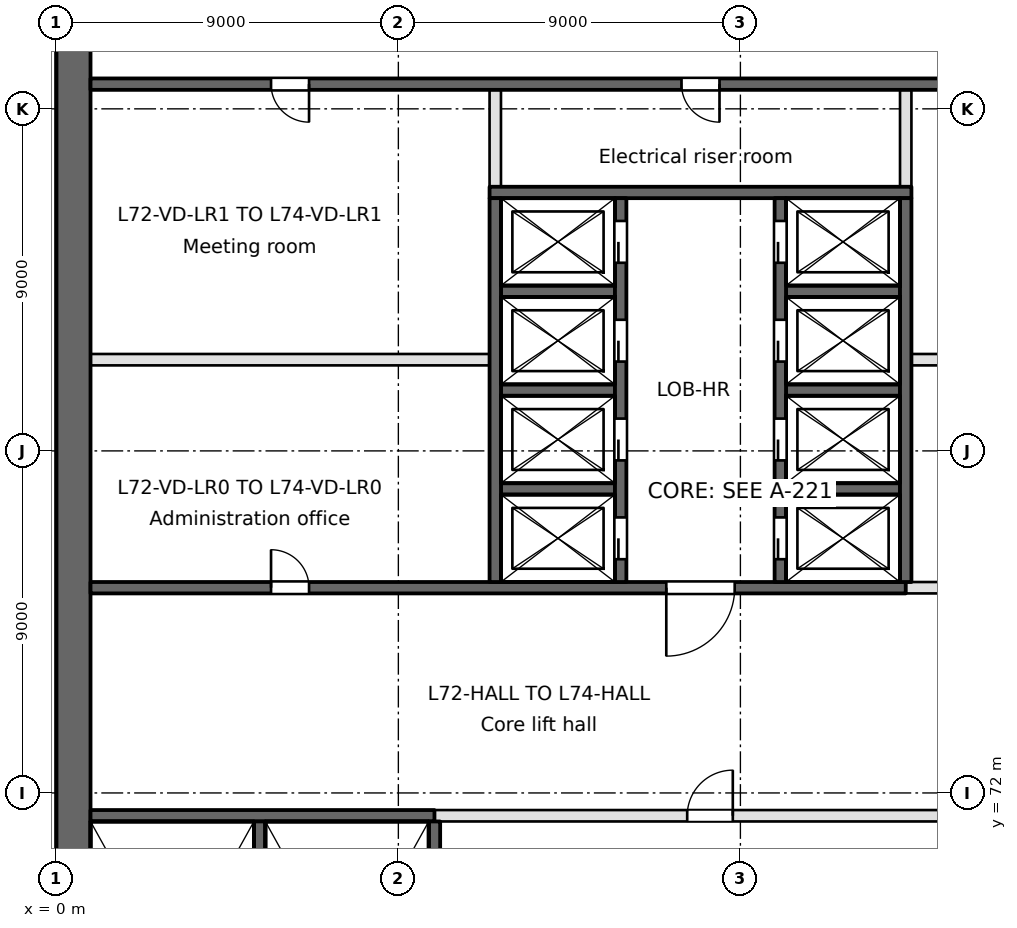
"""IFC4 building model, lengths in metres.
Left out: names, types, materials, properties, quantities, classifications, styles, units other than length and angle.
Written with IfcOpenShell. Run it as: python <this file> out.ifc"""

import sys

from ifc_helpers import new_model, si_unit, direction, frame, frame_2d, origin, place, context, subcontext, project, spatial, rectangle, extrude, element, fill, save


model = new_model("IFC4")
c1 = context("Model", 3, precision=1e-05, world=origin(), true_north=direction((0.0, 1.0)))
c2 = subcontext(c1, "Body", "Model", "MODEL_VIEW")
j1 = project(units=[si_unit("LENGTHUNIT", "METRE"), si_unit("PLANEANGLEUNIT", "RADIAN")], contexts=[c1])
p1 = place(None, origin())
s1 = spatial("IfcSite", under=j1, at=p1, CompositionType="ELEMENT")
p2 = place(p1, origin())
s2 = spatial("IfcBuilding", under=s1, at=p2, CompositionType="ELEMENT")
p3 = place(p2, frame((0.0, 0.0, 280.8)))
s3 = spatial("IfcBuildingStorey", under=s2, at=p3, CompositionType="ELEMENT", Elevation=280.8)
p4 = place(p3, frame((0.45, 94.5, 0.0), z_axis=(0.0, 0.0, 1.0), x_axis=(0.0, -1.0, 0.0)))
e1 = element("IfcWall", 1, at=p4, inside=s3, PredefinedType="SHEAR", context=c2, shape_type="SweptSolid", body=[
    extrude(rectangle(XDim=40.456, YDim=0.9, at=frame_2d((20.228, 0.0))), origin(), (0.0, 0.0, 1.0), 3.7),
])
p5 = place(p3, frame((0.9, 71.4, -0.4), z_axis=(0.0, 0.0, 1.0), x_axis=(1.0, 0.0, 0.0)))
e2 = element("IfcWall", 2, at=p5, inside=s3, PredefinedType="SOLIDWALL", context=c2, shape_type="SweptSolid", body=[
    extrude(rectangle(XDim=9.05, YDim=0.3, at=frame_2d((4.525, 0.0))), origin(), (0.0, 0.0, 1.0), 3.7),
])
p6 = place(p3, frame((9.95, 71.4, 0.0), z_axis=(0.0, 0.0, 1.0), x_axis=(1.0, 0.0, 0.0)))
e3 = element("IfcWall", 3, at=p6, inside=s3, PredefinedType="PARTITIONING", context=c2, shape_type="SweptSolid", body=[
    extrude(rectangle(XDim=17.65, YDim=0.3, at=frame_2d((8.825, 0.0))), origin(), (0.0, 0.0, 1.0), 3.3),
])
p7 = place(p6, frame((15.1, 0.0, 0.0)))
e4 = element("IfcOpeningElement", 4, at=p7, cuts=e3, PredefinedType="OPENING", context=c2, shape_type="SweptSolid", body=[
    extrude(rectangle(XDim=1.8, YDim=2.1, at=frame_2d((0.9, 1.05))), frame((0.0, 0.15, 0.0), z_axis=(0.0, -1.0, 0.0), x_axis=(1.0, 0.0, 0.0)), (0.0, 0.0, 1.0), 0.3),
])
p8 = place(p6, frame((6.65, 0.0, 0.0)))
e5 = element("IfcOpeningElement", 5, at=p8, cuts=e3, PredefinedType="OPENING", context=c2, shape_type="SweptSolid", body=[
    extrude(rectangle(XDim=1.2, YDim=2.1, at=frame_2d((0.6, 1.05))), frame((0.0, 0.15, 0.0), z_axis=(0.0, -1.0, 0.0), x_axis=(1.0, 0.0, 0.0)), (0.0, 0.0, 1.0), 0.3),
])
p9 = place(p3, frame((0.9, 77.4, -0.4), z_axis=(0.0, 0.0, 1.0), x_axis=(1.0, 0.0, 0.0)))
e6 = element("IfcWall", 6, at=p9, inside=s3, PredefinedType="SOLIDWALL", context=c2, shape_type="SweptSolid", body=[
    extrude(rectangle(XDim=21.45, YDim=0.3, at=frame_2d((10.725, 0.0))), origin(), (0.0, 0.0, 1.0), 3.7),
])
p10 = place(p9, frame((15.15, 0.0, 0.4)))
e7 = element("IfcOpeningElement", 7, at=p10, cuts=e6, PredefinedType="OPENING", context=c2, shape_type="SweptSolid", body=[
    extrude(rectangle(XDim=1.8, YDim=2.1, at=frame_2d((0.9, 1.05))), frame((0.0, 0.15, 0.0), z_axis=(0.0, -1.0, 0.0), x_axis=(1.0, 0.0, 0.0)), (0.0, 0.0, 1.0), 0.3),
])
p11 = place(p9, frame((4.75, 0.0, 0.4)))
e8 = element("IfcOpeningElement", 8, at=p11, cuts=e6, PredefinedType="OPENING", context=c2, shape_type="SweptSolid", body=[
    extrude(rectangle(XDim=1.0, YDim=2.1, at=frame_2d((0.5, 1.05))), frame((0.0, 0.15, 0.0), z_axis=(0.0, -1.0, 0.0), x_axis=(1.0, 0.0, 0.0)), (0.0, 0.0, 1.0), 0.3),
])
p12 = place(p3, frame((22.35, 77.4, 0.0), z_axis=(0.0, 0.0, 1.0), x_axis=(1.0, 0.0, 0.0)))
e9 = element("IfcWall", 9, at=p12, inside=s3, PredefinedType="PARTITIONING", context=c2, shape_type="SweptSolid", body=[
    extrude(rectangle(XDim=13.15, YDim=0.3, at=frame_2d((6.575, 0.0))), origin(), (0.0, 0.0, 1.0), 3.3),
])
p13 = place(p12, frame((6.2, 0.0, 0.0)))
e10 = element("IfcOpeningElement", 10, at=p13, cuts=e9, PredefinedType="OPENING", context=c2, shape_type="SweptSolid", body=[
    extrude(rectangle(XDim=1.0, YDim=2.1, at=frame_2d((0.5, 1.05))), frame((0.0, 0.15, 0.0), z_axis=(0.0, -1.0, 0.0), x_axis=(1.0, 0.0, 0.0)), (0.0, 0.0, 1.0), 0.3),
])
for number, where, z_axis, x_axis in (
    (11, (11.7, 80.0, -0.4), (0.0, 0.0, 1.0), (1.0, 0.0, 0.0)),
    (12, (19.2, 80.0, -0.4), (0.0, 0.0, 1.0), (1.0, 0.0, 0.0)),
    (13, (11.7, 82.6, -0.4), (0.0, 0.0, 1.0), (1.0, 0.0, 0.0)),
    (14, (19.2, 82.6, -0.4), (0.0, 0.0, 1.0), (1.0, 0.0, 0.0)),
):
    element("IfcWall", number, at=place(p3, frame(where, z_axis=z_axis, x_axis=x_axis)), inside=s3, PredefinedType="SOLIDWALL", context=c2, shape_type="SweptSolid", body=[
        extrude(rectangle(XDim=3.0, YDim=0.3, at=frame_2d((1.5, 0.0))), origin(), (0.0, 0.0, 1.0), 3.7),
    ])
p14 = place(p3, frame((0.9, 83.4, 0.0), z_axis=(0.0, 0.0, 1.0), x_axis=(1.0, 0.0, 0.0)))
e15 = element("IfcWall", 15, at=p14, inside=s3, PredefinedType="PARTITIONING", context=c2, shape_type="SweptSolid", body=[
    extrude(rectangle(XDim=10.5, YDim=0.3, at=frame_2d((5.25, 0.0))), origin(), (0.0, 0.0, 1.0), 3.3),
])
p15 = place(p3, frame((22.5, 83.4, 0.0), z_axis=(0.0, 0.0, 1.0), x_axis=(1.0, 0.0, 0.0)))
e16 = element("IfcWall", 16, at=p15, inside=s3, PredefinedType="PARTITIONING", context=c2, shape_type="SweptSolid", body=[
    extrude(rectangle(XDim=13.0, YDim=0.3, at=frame_2d((6.5, 0.0))), origin(), (0.0, 0.0, 1.0), 3.3),
])
for number, where, z_axis, x_axis in (
    (17, (11.7, 85.2, -0.4), (0.0, 0.0, 1.0), (1.0, 0.0, 0.0)),
    (18, (19.2, 85.2, -0.4), (0.0, 0.0, 1.0), (1.0, 0.0, 0.0)),
):
    element("IfcWall", number, at=place(p3, frame(where, z_axis=z_axis, x_axis=x_axis)), inside=s3, PredefinedType="SOLIDWALL", context=c2, shape_type="SweptSolid", body=[
        extrude(rectangle(XDim=3.0, YDim=0.3, at=frame_2d((1.5, 0.0))), origin(), (0.0, 0.0, 1.0), 3.7),
    ])
p16 = place(p3, frame((11.4, 87.8, -0.4), z_axis=(0.0, 0.0, 1.0), x_axis=(1.0, 0.0, 0.0)))
e19 = element("IfcWall", 19, at=p16, inside=s3, PredefinedType="SOLIDWALL", context=c2, shape_type="SweptSolid", body=[
    extrude(rectangle(XDim=11.1, YDim=0.3, at=frame_2d((5.55, 0.0))), origin(), (0.0, 0.0, 1.0), 3.7),
])
p17 = place(p3, frame((0.9, 90.65, -0.4), z_axis=(0.0, 0.0, 1.0), x_axis=(1.0, 0.0, 0.0)))
e20 = element("IfcWall", 20, at=p17, inside=s3, PredefinedType="SOLIDWALL", context=c2, shape_type="SweptSolid", body=[
    extrude(rectangle(XDim=34.6, YDim=0.3, at=frame_2d((17.3, 0.0))), origin(), (0.0, 0.0, 1.0), 3.7),
])
p18 = place(p17, frame((15.55, 0.0, 0.4)))
e21 = element("IfcOpeningElement", 21, at=p18, cuts=e20, PredefinedType="OPENING", context=c2, shape_type="SweptSolid", body=[
    extrude(rectangle(XDim=1.0, YDim=2.1, at=frame_2d((0.5, 1.05))), frame((0.0, 0.15, 0.0), z_axis=(0.0, -1.0, 0.0), x_axis=(1.0, 0.0, 0.0)), (0.0, 0.0, 1.0), 0.3),
])
p19 = place(p17, frame((4.75, 0.0, 0.4)))
e22 = element("IfcOpeningElement", 22, at=p19, cuts=e20, PredefinedType="OPENING", context=c2, shape_type="SweptSolid", body=[
    extrude(rectangle(XDim=1.0, YDim=2.1, at=frame_2d((0.5, 1.05))), frame((0.0, 0.15, 0.0), z_axis=(0.0, -1.0, 0.0), x_axis=(1.0, 0.0, 0.0)), (0.0, 0.0, 1.0), 0.3),
])
p20 = place(p17, frame((27.65, 0.0, 0.4)))
e23 = element("IfcOpeningElement", 23, at=p20, cuts=e20, PredefinedType="OPENING", context=c2, shape_type="SweptSolid", body=[
    extrude(rectangle(XDim=1.0, YDim=2.1, at=frame_2d((0.5, 1.05))), frame((0.0, 0.15, 0.0), z_axis=(0.0, -1.0, 0.0), x_axis=(1.0, 0.0, 0.0)), (0.0, 0.0, 1.0), 0.3),
])
for number, where, z_axis, x_axis in (
    (24, (5.35, 63.5, -0.4), (0.0, 0.0, 1.0), (0.0, 1.0, 0.0)),
    (25, (9.95, 63.5, -0.4), (0.0, 0.0, 1.0), (0.0, 1.0, 0.0)),
):
    element("IfcWall", number, at=place(p3, frame(where, z_axis=z_axis, x_axis=x_axis)), inside=s3, PredefinedType="SOLIDWALL", context=c2, shape_type="SweptSolid", body=[
        extrude(rectangle(XDim=7.75, YDim=0.3, at=frame_2d((3.875, 0.0))), origin(), (0.0, 0.0, 1.0), 3.7),
    ])
p21 = place(p3, frame((11.55, 77.55, -0.4), z_axis=(0.0, 0.0, 1.0), x_axis=(0.0, 1.0, 0.0)))
e26 = element("IfcWall", 26, at=p21, inside=s3, PredefinedType="SOLIDWALL", context=c2, shape_type="SweptSolid", body=[
    extrude(rectangle(XDim=10.1, YDim=0.3, at=frame_2d((5.05, 0.0))), origin(), (0.0, 0.0, 1.0), 3.7),
])
p22 = place(p3, frame((11.55, 87.95, 0.0), z_axis=(0.0, 0.0, 1.0), x_axis=(0.0, 1.0, 0.0)))
e27 = element("IfcWall", 27, at=p22, inside=s3, PredefinedType="PARTITIONING", context=c2, shape_type="SweptSolid", body=[
    extrude(rectangle(XDim=2.55, YDim=0.3, at=frame_2d((1.275, 0.0))), origin(), (0.0, 0.0, 1.0), 3.3),
])
p23 = place(p3, frame((14.85, 77.55, -0.4), z_axis=(0.0, 0.0, 1.0), x_axis=(0.0, 1.0, 0.0)))
e28 = element("IfcWall", 28, at=p23, inside=s3, PredefinedType="SOLIDWALL", context=c2, shape_type="SweptSolid", body=[
    extrude(rectangle(XDim=10.1, YDim=0.3, at=frame_2d((5.05, 0.0))), origin(), (0.0, 0.0, 1.0), 3.7),
])
p24 = place(p23, frame((0.6, 0.0, 0.4)))
e29 = element("IfcOpeningElement", 29, at=p24, cuts=e28, PredefinedType="OPENING", context=c2, shape_type="SweptSolid", body=[
    extrude(rectangle(XDim=1.1, YDim=2.1, at=frame_2d((0.55, 1.05))), frame((0.0, 0.15, 0.0), z_axis=(0.0, -1.0, 0.0), x_axis=(1.0, 0.0, 0.0)), (0.0, 0.0, 1.0), 0.3),
])
p25 = place(p23, frame((3.2, 0.0, 0.4)))
e30 = element("IfcOpeningElement", 30, at=p25, cuts=e28, PredefinedType="OPENING", context=c2, shape_type="SweptSolid", body=[
    extrude(rectangle(XDim=1.1, YDim=2.1, at=frame_2d((0.55, 1.05))), frame((0.0, 0.15, 0.0), z_axis=(0.0, -1.0, 0.0), x_axis=(1.0, 0.0, 0.0)), (0.0, 0.0, 1.0), 0.3),
])
p26 = place(p23, frame((5.8, 0.0, 0.4)))
e31 = element("IfcOpeningElement", 31, at=p26, cuts=e28, PredefinedType="OPENING", context=c2, shape_type="SweptSolid", body=[
    extrude(rectangle(XDim=1.1, YDim=2.1, at=frame_2d((0.55, 1.05))), frame((0.0, 0.15, 0.0), z_axis=(0.0, -1.0, 0.0), x_axis=(1.0, 0.0, 0.0)), (0.0, 0.0, 1.0), 0.3),
])
p27 = place(p23, frame((8.4, 0.0, 0.4)))
e32 = element("IfcOpeningElement", 32, at=p27, cuts=e28, PredefinedType="OPENING", context=c2, shape_type="SweptSolid", body=[
    extrude(rectangle(XDim=1.1, YDim=2.1, at=frame_2d((0.55, 1.05))), frame((0.0, 0.15, 0.0), z_axis=(0.0, -1.0, 0.0), x_axis=(1.0, 0.0, 0.0)), (0.0, 0.0, 1.0), 0.3),
])
p28 = place(p3, frame((19.05, 77.55, -0.4), z_axis=(0.0, 0.0, 1.0), x_axis=(0.0, 1.0, 0.0)))
e33 = element("IfcWall", 33, at=p28, inside=s3, PredefinedType="SOLIDWALL", context=c2, shape_type="SweptSolid", body=[
    extrude(rectangle(XDim=10.1, YDim=0.3, at=frame_2d((5.05, 0.0))), origin(), (0.0, 0.0, 1.0), 3.7),
])
p29 = place(p28, frame((0.6, 0.0, 0.4)))
e34 = element("IfcOpeningElement", 34, at=p29, cuts=e33, PredefinedType="OPENING", context=c2, shape_type="SweptSolid", body=[
    extrude(rectangle(XDim=1.1, YDim=2.1, at=frame_2d((0.55, 1.05))), frame((0.0, 0.15, 0.0), z_axis=(0.0, -1.0, 0.0), x_axis=(1.0, 0.0, 0.0)), (0.0, 0.0, 1.0), 0.3),
])
p30 = place(p28, frame((3.2, 0.0, 0.4)))
e35 = element("IfcOpeningElement", 35, at=p30, cuts=e33, PredefinedType="OPENING", context=c2, shape_type="SweptSolid", body=[
    extrude(rectangle(XDim=1.1, YDim=2.1, at=frame_2d((0.55, 1.05))), frame((0.0, 0.15, 0.0), z_axis=(0.0, -1.0, 0.0), x_axis=(1.0, 0.0, 0.0)), (0.0, 0.0, 1.0), 0.3),
])
p31 = place(p28, frame((5.8, 0.0, 0.4)))
e36 = element("IfcOpeningElement", 36, at=p31, cuts=e33, PredefinedType="OPENING", context=c2, shape_type="SweptSolid", body=[
    extrude(rectangle(XDim=1.1, YDim=2.1, at=frame_2d((0.55, 1.05))), frame((0.0, 0.15, 0.0), z_axis=(0.0, -1.0, 0.0), x_axis=(1.0, 0.0, 0.0)), (0.0, 0.0, 1.0), 0.3),
])
p32 = place(p28, frame((8.4, 0.0, 0.4)))
e37 = element("IfcOpeningElement", 37, at=p32, cuts=e33, PredefinedType="OPENING", context=c2, shape_type="SweptSolid", body=[
    extrude(rectangle(XDim=1.1, YDim=2.1, at=frame_2d((0.55, 1.05))), frame((0.0, 0.15, 0.0), z_axis=(0.0, -1.0, 0.0), x_axis=(1.0, 0.0, 0.0)), (0.0, 0.0, 1.0), 0.3),
])
p33 = place(p3, frame((22.35, 77.55, -0.4), z_axis=(0.0, 0.0, 1.0), x_axis=(0.0, 1.0, 0.0)))
e38 = element("IfcWall", 38, at=p33, inside=s3, PredefinedType="SOLIDWALL", context=c2, shape_type="SweptSolid", body=[
    extrude(rectangle(XDim=10.1, YDim=0.3, at=frame_2d((5.05, 0.0))), origin(), (0.0, 0.0, 1.0), 3.7),
])
p34 = place(p3, frame((22.35, 87.95, 0.0), z_axis=(0.0, 0.0, 1.0), x_axis=(0.0, 1.0, 0.0)))
e39 = element("IfcWall", 39, at=p34, inside=s3, PredefinedType="PARTITIONING", context=c2, shape_type="SweptSolid", body=[
    extrude(rectangle(XDim=2.55, YDim=0.3, at=frame_2d((1.275, 0.0))), origin(), (0.0, 0.0, 1.0), 3.3),
])
p35 = place(p24, origin())
e40 = element("IfcDoor", 40, at=p35, inside=s3, OperationType="SLIDING_TO_RIGHT", PredefinedType="DOOR", context=c2, shape_type="SweptSolid", body=[
    extrude(rectangle(XDim=1.1, YDim=2.1, at=frame_2d((0.55, 1.05))), frame((0.0, 0.025, 0.0), z_axis=(0.0, -1.0, 0.0), x_axis=(1.0, 0.0, 0.0)), (0.0, 0.0, 1.0), 0.05),
])
fill(e29, e40)
p36 = place(p25, origin())
e41 = element("IfcDoor", 41, at=p36, inside=s3, OperationType="SLIDING_TO_LEFT", PredefinedType="DOOR", context=c2, shape_type="SweptSolid", body=[
    extrude(rectangle(XDim=1.1, YDim=2.1, at=frame_2d((0.55, 1.05))), frame((0.0, 0.025, 0.0), z_axis=(0.0, -1.0, 0.0), x_axis=(1.0, 0.0, 0.0)), (0.0, 0.0, 1.0), 0.05),
])
fill(e30, e41)
p37 = place(p26, origin())
e42 = element("IfcDoor", 42, at=p37, inside=s3, OperationType="SLIDING_TO_RIGHT", PredefinedType="DOOR", context=c2, shape_type="SweptSolid", body=[
    extrude(rectangle(XDim=1.1, YDim=2.1, at=frame_2d((0.55, 1.05))), frame((0.0, 0.025, 0.0), z_axis=(0.0, -1.0, 0.0), x_axis=(1.0, 0.0, 0.0)), (0.0, 0.0, 1.0), 0.05),
])
fill(e31, e42)
p38 = place(p27, origin())
e43 = element("IfcDoor", 43, at=p38, inside=s3, OperationType="SLIDING_TO_LEFT", PredefinedType="DOOR", context=c2, shape_type="SweptSolid", body=[
    extrude(rectangle(XDim=1.1, YDim=2.1, at=frame_2d((0.55, 1.05))), frame((0.0, 0.025, 0.0), z_axis=(0.0, -1.0, 0.0), x_axis=(1.0, 0.0, 0.0)), (0.0, 0.0, 1.0), 0.05),
])
fill(e32, e43)
p39 = place(p29, origin())
e44 = element("IfcDoor", 44, at=p39, inside=s3, OperationType="SLIDING_TO_RIGHT", PredefinedType="DOOR", context=c2, shape_type="SweptSolid", body=[
    extrude(rectangle(XDim=1.1, YDim=2.1, at=frame_2d((0.55, 1.05))), frame((0.0, 0.025, 0.0), z_axis=(0.0, -1.0, 0.0), x_axis=(1.0, 0.0, 0.0)), (0.0, 0.0, 1.0), 0.05),
])
fill(e34, e44)
p40 = place(p30, origin())
e45 = element("IfcDoor", 45, at=p40, inside=s3, OperationType="SLIDING_TO_LEFT", PredefinedType="DOOR", context=c2, shape_type="SweptSolid", body=[
    extrude(rectangle(XDim=1.1, YDim=2.1, at=frame_2d((0.55, 1.05))), frame((0.0, 0.025, 0.0), z_axis=(0.0, -1.0, 0.0), x_axis=(1.0, 0.0, 0.0)), (0.0, 0.0, 1.0), 0.05),
])
fill(e35, e45)
p41 = place(p31, origin())
e46 = element("IfcDoor", 46, at=p41, inside=s3, OperationType="SLIDING_TO_RIGHT", PredefinedType="DOOR", context=c2, shape_type="SweptSolid", body=[
    extrude(rectangle(XDim=1.1, YDim=2.1, at=frame_2d((0.55, 1.05))), frame((0.0, 0.025, 0.0), z_axis=(0.0, -1.0, 0.0), x_axis=(1.0, 0.0, 0.0)), (0.0, 0.0, 1.0), 0.05),
])
fill(e36, e46)
p42 = place(p32, origin())
e47 = element("IfcDoor", 47, at=p42, inside=s3, OperationType="SLIDING_TO_LEFT", PredefinedType="DOOR", context=c2, shape_type="SweptSolid", body=[
    extrude(rectangle(XDim=1.1, YDim=2.1, at=frame_2d((0.55, 1.05))), frame((0.0, 0.025, 0.0), z_axis=(0.0, -1.0, 0.0), x_axis=(1.0, 0.0, 0.0)), (0.0, 0.0, 1.0), 0.05),
])
fill(e37, e47)
p43 = place(p10, frame((1.8, 0.0, 0.0), z_axis=(0.0, 0.0, 1.0), x_axis=(-1.0, 0.0, 0.0)))
e48 = element("IfcDoor", 48, at=p43, inside=s3, OperationType="SINGLE_SWING_RIGHT", PredefinedType="DOOR", context=c2, shape_type="SweptSolid", body=[
    extrude(rectangle(XDim=1.8, YDim=2.1, at=frame_2d((0.9, 1.05))), frame((0.0, 0.025, 0.0), z_axis=(0.0, -1.0, 0.0), x_axis=(1.0, 0.0, 0.0)), (0.0, 0.0, 1.0), 0.05),
])
fill(e7, e48)
p44 = place(p8, origin())
e49 = element("IfcDoor", 49, at=p44, inside=s3, OperationType="SINGLE_SWING_RIGHT", PredefinedType="DOOR", context=c2, shape_type="SweptSolid", body=[
    extrude(rectangle(XDim=1.2, YDim=2.1, at=frame_2d((0.6, 1.05))), frame((0.0, 0.025, 0.0), z_axis=(0.0, -1.0, 0.0), x_axis=(1.0, 0.0, 0.0)), (0.0, 0.0, 1.0), 0.05),
])
fill(e5, e49)
p45 = place(p18, frame((1.0, 0.0, 0.0), z_axis=(0.0, 0.0, 1.0), x_axis=(-1.0, 0.0, 0.0)))
e50 = element("IfcDoor", 50, at=p45, inside=s3, OperationType="SINGLE_SWING_LEFT", PredefinedType="DOOR", context=c2, shape_type="SweptSolid", body=[
    extrude(rectangle(XDim=1.0, YDim=2.1, at=frame_2d((0.5, 1.05))), frame((0.0, 0.025, 0.0), z_axis=(0.0, -1.0, 0.0), x_axis=(1.0, 0.0, 0.0)), (0.0, 0.0, 1.0), 0.05),
])
fill(e21, e50)
p46 = place(p11, origin())
e51 = element("IfcDoor", 51, at=p46, inside=s3, OperationType="SINGLE_SWING_LEFT", PredefinedType="DOOR", context=c2, shape_type="SweptSolid", body=[
    extrude(rectangle(XDim=1.0, YDim=2.1, at=frame_2d((0.5, 1.05))), frame((0.0, 0.025, 0.0), z_axis=(0.0, -1.0, 0.0), x_axis=(1.0, 0.0, 0.0)), (0.0, 0.0, 1.0), 0.05),
])
fill(e8, e51)
p47 = place(p19, frame((1.0, 0.0, 0.0), z_axis=(0.0, 0.0, 1.0), x_axis=(-1.0, 0.0, 0.0)))
e52 = element("IfcDoor", 52, at=p47, inside=s3, OperationType="SINGLE_SWING_LEFT", PredefinedType="DOOR", context=c2, shape_type="SweptSolid", body=[
    extrude(rectangle(XDim=1.0, YDim=2.1, at=frame_2d((0.5, 1.05))), frame((0.0, 0.025, 0.0), z_axis=(0.0, -1.0, 0.0), x_axis=(1.0, 0.0, 0.0)), (0.0, 0.0, 1.0), 0.05),
])
fill(e22, e52)
save(model, sys.argv[1])
